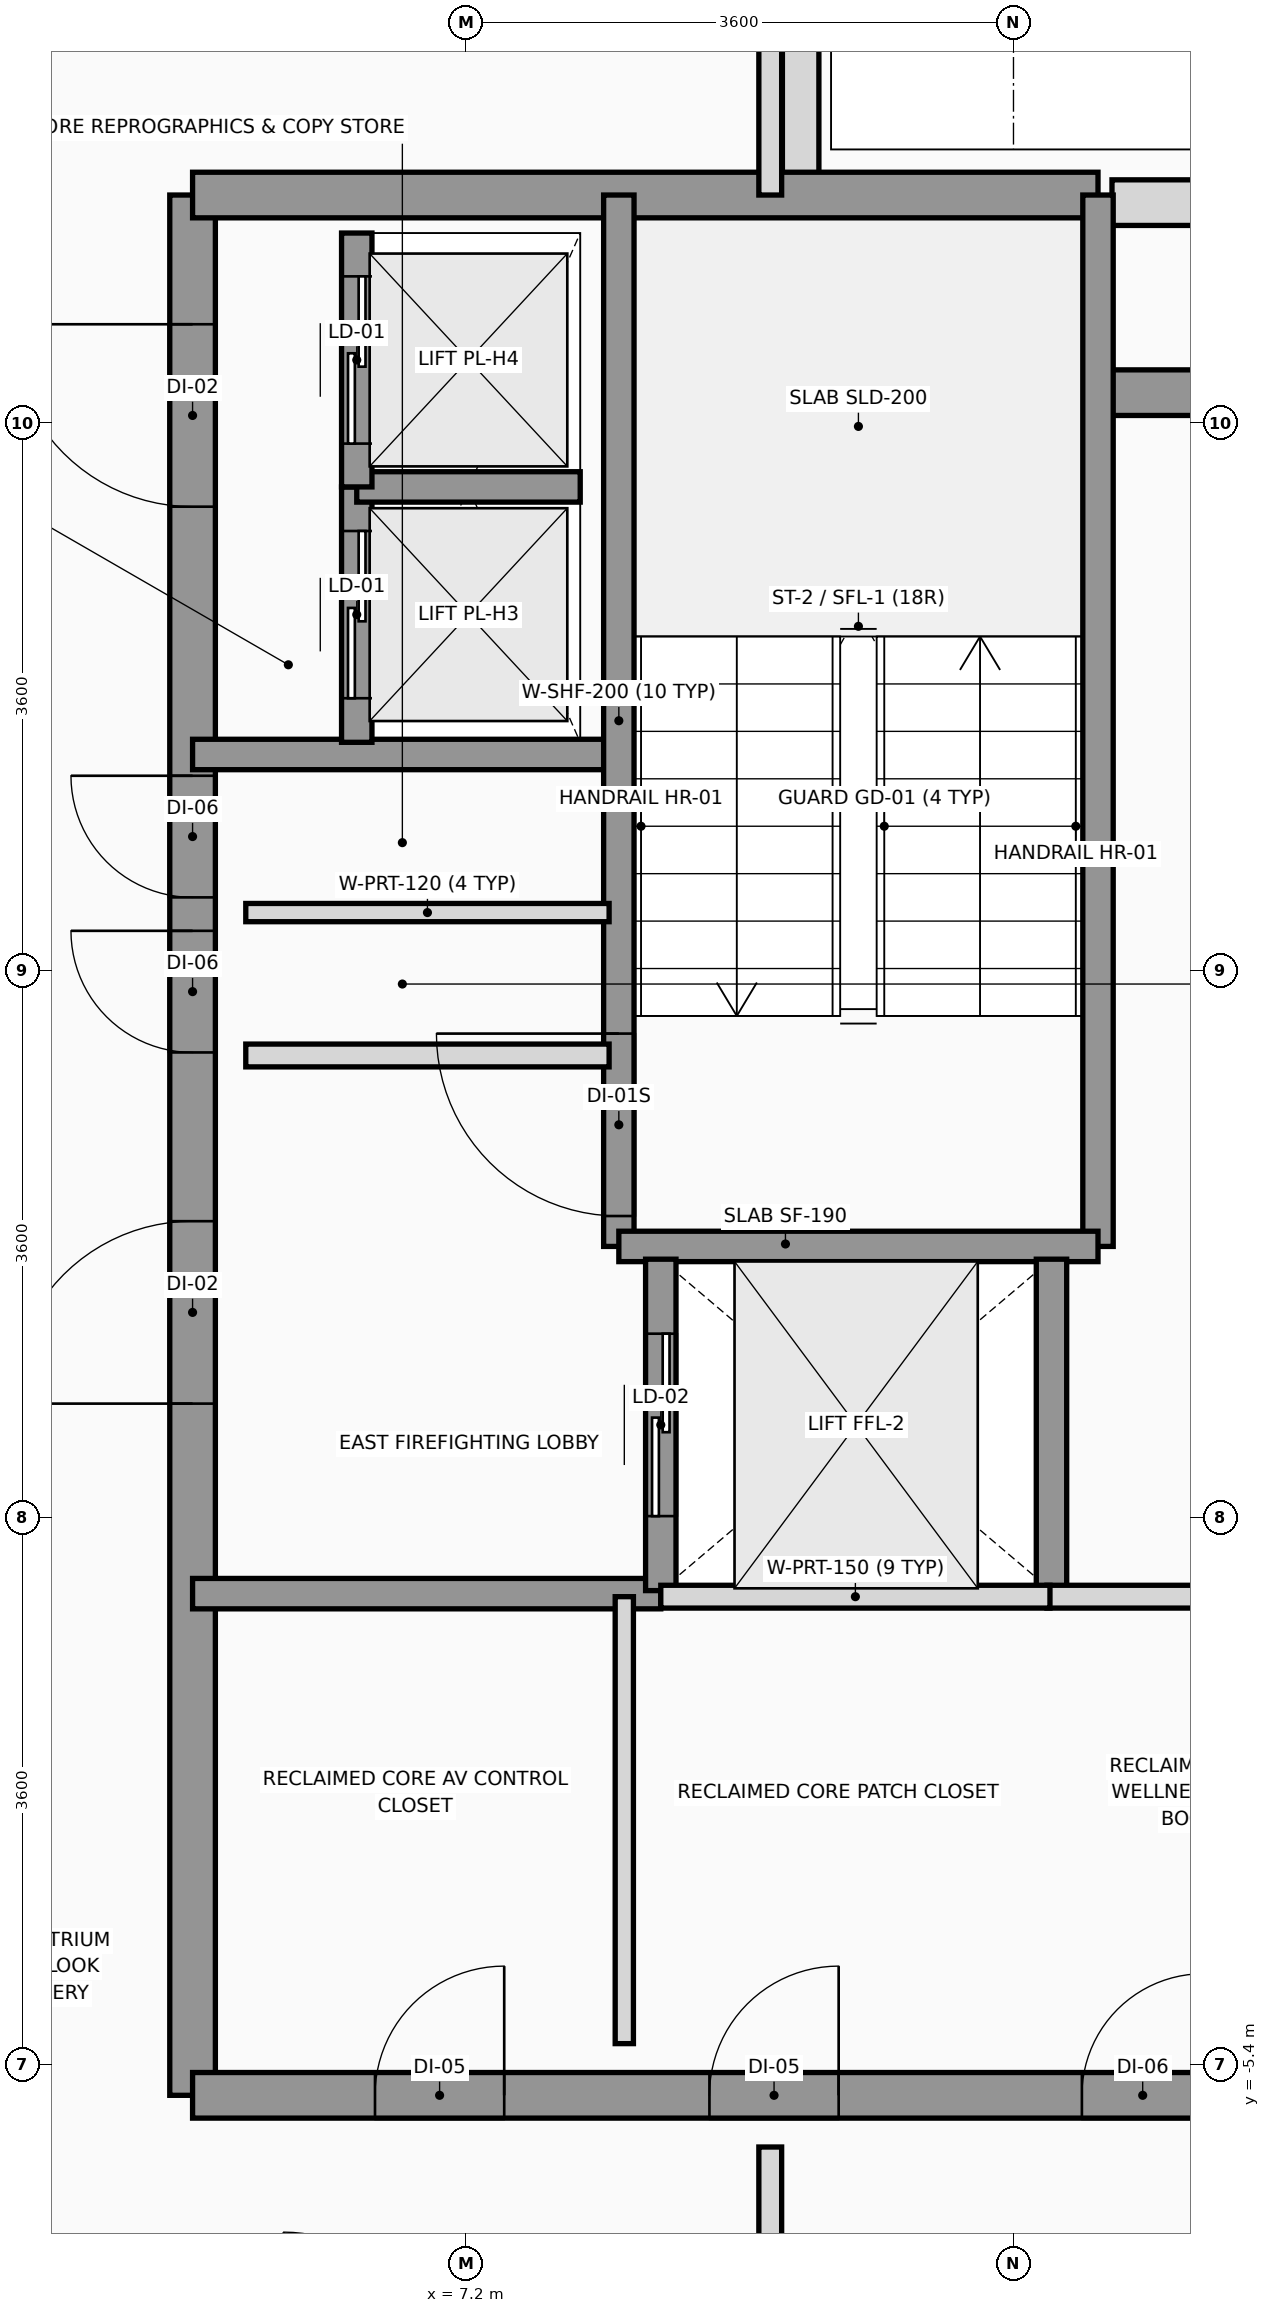
"""IFC4 building model, lengths in metres.
Left out: names, types, materials, properties, quantities, classifications, styles, units other than length and angle.
Written with IfcOpenShell. Run it as: python <this file> out.ifc"""

import sys

from ifc_helpers import new_model, si_unit, direction, frame, frame_2d, origin, place, context, subcontext, project, spatial, rectangle, extrude, source, transform, mapped, element, fill, save


model = new_model("IFC4")
c1 = context("Model", 3, precision=1e-05, world=origin(), true_north=direction((0.0, 1.0)))
c2 = subcontext(c1, "Body", "Model", "MODEL_VIEW")
j1 = project(units=[si_unit("LENGTHUNIT", "METRE"), si_unit("PLANEANGLEUNIT", "RADIAN")], contexts=[c1])
p1 = place(None, origin())
s1 = spatial("IfcSite", under=j1, at=p1, CompositionType="ELEMENT")
p2 = place(p1, origin())
s2 = spatial("IfcBuilding", under=s1, at=p2, CompositionType="ELEMENT")
p3 = place(p2, frame((0.0, 0.0, 223.6)))
s3 = spatial("IfcBuildingStorey", under=s2, at=p3, CompositionType="ELEMENT", Elevation=223.6)
p4 = place(p3, frame((11.448, 6.85, 0.0), z_axis=(0.0, 0.0, 1.0), x_axis=(1.0, 0.0, 0.0)))
e1 = element("IfcWall", 1, at=p4, inside=s3, PredefinedType="SOLIDWALL", context=c2, shape_type="SweptSolid", body=[
    extrude(rectangle(XDim=2.685, YDim=0.3, at=frame_2d((1.343, 0.0))), origin(), (0.0, 0.0, 1.0), 2.57),
])
p5 = place(p3, frame((9.4, 8.622, 0.0), z_axis=(0.0, 0.0, 1.0), x_axis=(0.0, -1.0, 0.0)))
e2 = element("IfcWall", 2, at=p5, inside=s3, PredefinedType="PARAPET", context=c2, shape_type="SweptSolid", body=[
    extrude(rectangle(XDim=1.669, YDim=0.24, at=frame_2d((0.834, 0.0))), origin(), (0.0, 0.0, 1.0), 1.15),
])
p6 = place(p3, frame((5.4, -5.6, 0.0), z_axis=(0.0, 0.0, 1.0), x_axis=(0.0, 1.0, 0.0)))
e3 = element("IfcWall", 3, at=p6, inside=s3, PredefinedType="SHEAR", context=c2, shape_type="SweptSolid", body=[
    extrude(rectangle(XDim=12.5, YDim=0.3, at=frame_2d((6.25, 0.0))), origin(), (0.0, 0.0, 1.0), 3.01),
])
p7 = place(p6, frame((4.55, 0.0, 0.0)))
e4 = element("IfcOpeningElement", 4, at=p7, cuts=e3, PredefinedType="OPENING", context=c2, shape_type="SweptSolid", body=[
    extrude(rectangle(XDim=1.2, YDim=2.2, at=frame_2d((0.6, 1.1))), frame((0.0, 0.16, 0.0), z_axis=(0.0, -1.0, 0.0), x_axis=(1.0, 0.0, 0.0)), (0.0, 0.0, 1.0), 0.32),
])
p8 = place(p6, frame((10.45, 0.0, 0.0)))
e5 = element("IfcOpeningElement", 5, at=p8, cuts=e3, PredefinedType="OPENING", context=c2, shape_type="SweptSolid", body=[
    extrude(rectangle(XDim=1.2, YDim=2.2, at=frame_2d((0.6, 1.1))), frame((0.0, 0.16, 0.0), z_axis=(0.0, -1.0, 0.0), x_axis=(1.0, 0.0, 0.0)), (0.0, 0.0, 1.0), 0.32),
])
p9 = place(p6, frame((6.86, 0.0, 0.0)))
e6 = element("IfcOpeningElement", 6, at=p9, cuts=e3, PredefinedType="OPENING", context=c2, shape_type="SweptSolid", body=[
    extrude(rectangle(XDim=0.8, YDim=2.1, at=frame_2d((0.4, 1.05))), frame((0.0, 0.16, 0.0), z_axis=(0.0, -1.0, 0.0), x_axis=(1.0, 0.0, 0.0)), (0.0, 0.0, 1.0), 0.32),
])
p10 = place(p6, frame((7.88, 0.0, 0.0)))
e7 = element("IfcOpeningElement", 7, at=p10, cuts=e3, PredefinedType="OPENING", context=c2, shape_type="SweptSolid", body=[
    extrude(rectangle(XDim=0.8, YDim=2.1, at=frame_2d((0.4, 1.05))), frame((0.0, 0.16, 0.0), z_axis=(0.0, -1.0, 0.0), x_axis=(1.0, 0.0, 0.0)), (0.0, 0.0, 1.0), 0.32),
])
p11 = place(p3, frame((5.4, 6.9, 0.0), z_axis=(0.0, 0.0, 1.0), x_axis=(1.0, 0.0, 0.0)))
e8 = element("IfcWall", 8, at=p11, inside=s3, PredefinedType="SHEAR", context=c2, shape_type="SweptSolid", body=[
    extrude(rectangle(XDim=5.956, YDim=0.3, at=frame_2d((2.978, 0.0))), origin(), (0.0, 0.0, 1.0), 3.01),
])
p12 = place(p3, frame((11.356, 5.6, 0.0), z_axis=(0.0, 0.0, 1.0), x_axis=(1.0, 0.0, 0.0)))
e9 = element("IfcWall", 9, at=p12, inside=s3, PredefinedType="SHEAR", context=c2, shape_type="SweptSolid", body=[
    extrude(rectangle(XDim=1.844, YDim=0.3, at=frame_2d((0.922, 0.0))), origin(), (0.0, 0.0, 1.0), 3.01),
])
p13 = place(p3, frame((5.4, -5.6, 0.0), z_axis=(0.0, 0.0, 1.0), x_axis=(1.0, 0.0, 0.0)))
e10 = element("IfcWall", 10, at=p13, inside=s3, PredefinedType="SHEAR", context=c2, shape_type="SweptSolid", body=[
    extrude(rectangle(XDim=7.8, YDim=0.3, at=frame_2d((3.9, 0.0))), origin(), (0.0, 0.0, 1.0), 3.01),
])
p14 = place(p13, frame((5.85, 0.0, 0.0)))
e11 = element("IfcOpeningElement", 11, at=p14, cuts=e10, PredefinedType="OPENING", context=c2, shape_type="SweptSolid", body=[
    extrude(rectangle(XDim=0.8, YDim=2.1, at=frame_2d((0.4, 1.05))), frame((0.0, 0.16, 0.0), z_axis=(0.0, -1.0, 0.0), x_axis=(1.0, 0.0, 0.0)), (0.0, 0.0, 1.0), 0.32),
])
p15 = place(p13, frame((1.2, 0.0, 0.0)))
e12 = element("IfcOpeningElement", 12, at=p15, cuts=e10, PredefinedType="OPENING", context=c2, shape_type="SweptSolid", body=[
    extrude(rectangle(XDim=0.85, YDim=2.1, at=frame_2d((0.425, 1.05))), frame((0.0, 0.16, 0.0), z_axis=(0.0, -1.0, 0.0), x_axis=(1.0, 0.0, 0.0)), (0.0, 0.0, 1.0), 0.32),
])
p16 = place(p13, frame((3.4, 0.0, 0.0)))
e13 = element("IfcOpeningElement", 13, at=p16, cuts=e10, PredefinedType="OPENING", context=c2, shape_type="SweptSolid", body=[
    extrude(rectangle(XDim=0.85, YDim=2.1, at=frame_2d((0.425, 1.05))), frame((0.0, 0.16, 0.0), z_axis=(0.0, -1.0, 0.0), x_axis=(1.0, 0.0, 0.0)), (0.0, 0.0, 1.0), 0.32),
])
p17 = place(p3, frame((5.4, 3.22, 0.0), z_axis=(0.0, 0.0, 1.0), x_axis=(1.0, 0.0, 0.0)))
e14 = element("IfcWall", 14, at=p17, inside=s3, PredefinedType="SOLIDWALL", context=c2, shape_type="SweptSolid", body=[
    extrude(rectangle(XDim=2.78, YDim=0.2, at=frame_2d((1.39, 0.0))), origin(), (0.0, 0.0, 1.0), 3.01),
])
p18 = place(p3, frame((5.4, -2.3, 0.0), z_axis=(0.0, 0.0, 1.0), x_axis=(1.0, 0.0, 0.0)))
e15 = element("IfcWall", 15, at=p18, inside=s3, PredefinedType="SOLIDWALL", context=c2, shape_type="SweptSolid", body=[
    extrude(rectangle(XDim=3.08, YDim=0.2, at=frame_2d((1.54, 0.0))), origin(), (0.0, 0.0, 1.0), 3.01),
])
p19 = place(p3, frame((8.204, -0.016, 0.0), z_axis=(0.0, 0.0, 1.0), x_axis=(0.0, 1.0, 0.0)))
e16 = element("IfcWall", 16, at=p19, inside=s3, PredefinedType="SOLIDWALL", context=c2, shape_type="SweptSolid", body=[
    extrude(rectangle(XDim=6.916, YDim=0.2, at=frame_2d((3.458, 0.0))), origin(), (0.0, 0.0, 1.0), 3.01),
])
p20 = place(p19, frame((0.2, 0.0, 0.0)))
e17 = element("IfcOpeningElement", 17, at=p20, cuts=e16, PredefinedType="OPENING", context=c2, shape_type="SweptSolid", body=[
    extrude(rectangle(XDim=1.2, YDim=2.2, at=frame_2d((0.6, 1.1))), frame((0.0, 0.11, 0.0), z_axis=(0.0, -1.0, 0.0), x_axis=(1.0, 0.0, 0.0)), (0.0, 0.0, 1.0), 0.22),
])
p21 = place(p3, frame((11.356, -0.016, 0.0), z_axis=(0.0, 0.0, 1.0), x_axis=(0.0, 1.0, 0.0)))
e18 = element("IfcWall", 18, at=p21, inside=s3, PredefinedType="SOLIDWALL", context=c2, shape_type="SweptSolid", body=[
    extrude(rectangle(XDim=6.916, YDim=0.2, at=frame_2d((3.458, 0.0))), origin(), (0.0, 0.0, 1.0), 3.01),
])
p22 = place(p3, frame((8.204, -0.016, 0.0), z_axis=(0.0, 0.0, 1.0), x_axis=(1.0, 0.0, 0.0)))
e19 = element("IfcWall", 19, at=p22, inside=s3, PredefinedType="SOLIDWALL", context=c2, shape_type="SweptSolid", body=[
    extrude(rectangle(XDim=3.152, YDim=0.2, at=frame_2d((1.576, 0.0))), origin(), (0.0, 0.0, 1.0), 3.01),
])
p23 = place(p3, frame((8.48, -2.28, 0.0), z_axis=(0.0, 0.0, 1.0), x_axis=(0.0, 1.0, 0.0)))
e20 = element("IfcWall", 20, at=p23, inside=s3, PredefinedType="SOLIDWALL", context=c2, shape_type="SweptSolid", body=[
    extrude(rectangle(XDim=2.18, YDim=0.2, at=frame_2d((1.09, 0.0))), origin(), (0.0, 0.0, 1.0), 3.01),
])
p24 = place(p23, frame((0.49, 0.0, 0.0)))
e21 = element("IfcOpeningElement", 21, at=p24, cuts=e20, PredefinedType="OPENING", context=c2, shape_type="SweptSolid", body=[
    extrude(rectangle(XDim=1.2, YDim=2.2, at=frame_2d((0.6, 1.1))), frame((0.0, 0.11, 0.0), z_axis=(0.0, -1.0, 0.0), x_axis=(1.0, 0.0, 0.0)), (0.0, 0.0, 1.0), 0.22),
])
p25 = place(p3, frame((11.05, -2.28, 0.0), z_axis=(0.0, 0.0, 1.0), x_axis=(0.0, 1.0, 0.0)))
e22 = element("IfcWall", 22, at=p25, inside=s3, PredefinedType="SOLIDWALL", context=c2, shape_type="SweptSolid", body=[
    extrude(rectangle(XDim=2.18, YDim=0.2, at=frame_2d((1.09, 0.0))), origin(), (0.0, 0.0, 1.0), 3.01),
])
p26 = place(p3, frame((6.48, 3.3, 0.0), z_axis=(0.0, 0.0, 1.0), x_axis=(0.0, 1.0, 0.0)))
e23 = element("IfcWall", 23, at=p26, inside=s3, PredefinedType="SOLIDWALL", context=c2, shape_type="SweptSolid", body=[
    extrude(rectangle(XDim=1.68, YDim=0.2, at=frame_2d((0.84, 0.0))), origin(), (0.0, 0.0, 1.0), 3.01),
])
p27 = place(p26, frame((0.29, 0.0, 0.0)))
e24 = element("IfcOpeningElement", 24, at=p27, cuts=e23, PredefinedType="OPENING", context=c2, shape_type="SweptSolid", body=[
    extrude(rectangle(XDim=1.1, YDim=2.2, at=frame_2d((0.55, 1.1))), frame((0.0, 0.11, 0.0), z_axis=(0.0, -1.0, 0.0), x_axis=(1.0, 0.0, 0.0)), (0.0, 0.0, 1.0), 0.22),
])
p28 = place(p3, frame((6.48, 4.98, 0.0), z_axis=(0.0, 0.0, 1.0), x_axis=(1.0, 0.0, 0.0)))
e25 = element("IfcWall", 25, at=p28, inside=s3, PredefinedType="SOLIDWALL", context=c2, shape_type="SweptSolid", body=[
    extrude(rectangle(XDim=1.47, YDim=0.2, at=frame_2d((0.735, 0.0))), origin(), (0.0, 0.0, 1.0), 3.01),
])
p29 = place(p3, frame((6.48, 4.98, 0.0), z_axis=(0.0, 0.0, 1.0), x_axis=(0.0, 1.0, 0.0)))
e26 = element("IfcWall", 26, at=p29, inside=s3, PredefinedType="SOLIDWALL", context=c2, shape_type="SweptSolid", body=[
    extrude(rectangle(XDim=1.67, YDim=0.2, at=frame_2d((0.835, 0.0))), origin(), (0.0, 0.0, 1.0), 3.01),
])
p30 = place(p29, frame((0.285, 0.0, 0.0)))
e27 = element("IfcOpeningElement", 27, at=p30, cuts=e26, PredefinedType="OPENING", context=c2, shape_type="SweptSolid", body=[
    extrude(rectangle(XDim=1.1, YDim=2.2, at=frame_2d((0.55, 1.1))), frame((0.0, 0.11, 0.0), z_axis=(0.0, -1.0, 0.0), x_axis=(1.0, 0.0, 0.0)), (0.0, 0.0, 1.0), 0.22),
])
p31 = place(p3, frame((5.75, 1.24, 0.0), z_axis=(0.0, 0.0, 1.0), x_axis=(1.0, 0.0, 0.0)))
e28 = element("IfcWall", 28, at=p31, inside=s3, PredefinedType="PARTITIONING", context=c2, shape_type="SweptSolid", body=[
    extrude(rectangle(XDim=2.39, YDim=0.15, at=frame_2d((1.195, 0.0))), origin(), (0.0, 0.0, 1.0), 3.01),
])
p32 = place(p3, frame((5.75, 2.18, 0.0), z_axis=(0.0, 0.0, 1.0), x_axis=(1.0, 0.0, 0.0)))
e29 = element("IfcWall", 29, at=p32, inside=s3, PredefinedType="PARTITIONING", context=c2, shape_type="SweptSolid", body=[
    extrude(rectangle(XDim=2.39, YDim=0.12, at=frame_2d((1.195, 0.0))), origin(), (0.0, 0.0, 1.0), 3.01),
])
p33 = place(p3, frame((11.02, -2.32, 0.0), z_axis=(0.0, 0.0, 1.0), x_axis=(1.0, 0.0, 0.0)))
e30 = element("IfcWall", 30, at=p33, inside=s3, PredefinedType="PARTITIONING", context=c2, shape_type="SweptSolid", body=[
    extrude(rectangle(XDim=2.18, YDim=0.15, at=frame_2d((1.09, 0.0))), origin(), (0.0, 0.0, 1.0), 3.01),
])
p34 = place(p3, frame((8.24, -5.26, 0.0), z_axis=(0.0, 0.0, 1.0), x_axis=(0.0, 1.0, 0.0)))
e31 = element("IfcWall", 31, at=p34, inside=s3, PredefinedType="PARTITIONING", context=c2, shape_type="SweptSolid", body=[
    extrude(rectangle(XDim=2.94, YDim=0.12, at=frame_2d((1.47, 0.0))), origin(), (0.0, 0.0, 1.0), 3.01),
])
p35 = place(p3, frame((8.48, -2.32, 0.0), z_axis=(0.0, 0.0, 1.0), x_axis=(1.0, 0.0, 0.0)))
e32 = element("IfcWall", 32, at=p35, inside=s3, PredefinedType="PARTITIONING", context=c2, shape_type="SweptSolid", body=[
    extrude(rectangle(XDim=2.56, YDim=0.15, at=frame_2d((1.28, 0.0))), origin(), (0.0, 0.0, 1.0), 3.01),
])
p36 = place(p3, frame((9.2, 6.9, 0.0), z_axis=(0.0, 0.0, 1.0), x_axis=(0.0, 1.0, 0.0)))
e33 = element("IfcWall", 33, at=p36, inside=s3, PredefinedType="PARTITIONING", context=c2, shape_type="SweptSolid", body=[
    extrude(rectangle(XDim=3.38, YDim=0.15, at=frame_2d((1.69, 0.0))), origin(), (0.0, 0.0, 1.0), 2.61),
])
p37 = place(p3, frame((9.2, -10.28, 0.0), z_axis=(0.0, 0.0, 1.0), x_axis=(0.0, 1.0, 0.0)))
e34 = element("IfcWall", 34, at=p37, inside=s3, PredefinedType="PARTITIONING", context=c2, shape_type="SweptSolid", body=[
    extrude(rectangle(XDim=4.34, YDim=0.15, at=frame_2d((2.17, 0.0))), origin(), (0.0, 0.0, 1.0), 2.61),
])
m1 = source(origin(), c2, "Body", "SweptSolid", [
    extrude(rectangle(XDim=1.2, YDim=2.2, at=frame_2d((0.6, 1.1))), frame((0.0, 0.025, 0.0), z_axis=(0.0, -1.0, 0.0), x_axis=(1.0, 0.0, 0.0)), (0.0, 0.0, 1.0), 0.05),
])
p38 = place(p20, origin())
e35 = element("IfcDoor", 35, at=p38, inside=s3, OperationType="SINGLE_SWING_RIGHT", PredefinedType="DOOR", context=c2, shape_type="MappedRepresentation", body=[
    mapped(m1, transform((0.0, 0.0, 0.0), x_axis=(1.0, 0.0, 0.0), y_axis=(0.0, 1.0, 0.0), z_axis=(0.0, 0.0, 1.0), scale=1.0)),
])
fill(e17, e35)
p39 = place(p7, origin())
e36 = element("IfcDoor", 36, at=p39, inside=s3, OperationType="SINGLE_SWING_LEFT", PredefinedType="DOOR", context=c2, shape_type="MappedRepresentation", body=[
    mapped(m1, transform((0.0, 0.0, 0.0), x_axis=(1.0, 0.0, 0.0), y_axis=(0.0, 1.0, 0.0), z_axis=(0.0, 0.0, 1.0), scale=1.0)),
])
fill(e4, e36)
p40 = place(p8, origin())
e37 = element("IfcDoor", 37, at=p40, inside=s3, OperationType="SINGLE_SWING_RIGHT", PredefinedType="DOOR", context=c2, shape_type="MappedRepresentation", body=[
    mapped(m1, transform((0.0, 0.0, 0.0), x_axis=(1.0, 0.0, 0.0), y_axis=(0.0, 1.0, 0.0), z_axis=(0.0, 0.0, 1.0), scale=1.0)),
])
fill(e5, e37)
m2 = source(origin(), c2, "Body", "SweptSolid", [
    extrude(rectangle(XDim=0.8, YDim=2.1, at=frame_2d((0.4, 1.05))), frame((0.0, 0.025, 0.0), z_axis=(0.0, -1.0, 0.0), x_axis=(1.0, 0.0, 0.0)), (0.0, 0.0, 1.0), 0.05),
])
p41 = place(p9, origin())
e38 = element("IfcDoor", 38, at=p41, inside=s3, OperationType="SINGLE_SWING_RIGHT", PredefinedType="DOOR", context=c2, shape_type="MappedRepresentation", body=[
    mapped(m2, transform((0.0, 0.0, 0.0), x_axis=(1.0, 0.0, 0.0), y_axis=(0.0, 1.0, 0.0), z_axis=(0.0, 0.0, 1.0), scale=1.0)),
])
fill(e6, e38)
p42 = place(p10, origin())
e39 = element("IfcDoor", 39, at=p42, inside=s3, OperationType="SINGLE_SWING_RIGHT", PredefinedType="DOOR", context=c2, shape_type="MappedRepresentation", body=[
    mapped(m2, transform((0.0, 0.0, 0.0), x_axis=(1.0, 0.0, 0.0), y_axis=(0.0, 1.0, 0.0), z_axis=(0.0, 0.0, 1.0), scale=1.0)),
])
fill(e7, e39)
p43 = place(p14, origin())
e40 = element("IfcDoor", 40, at=p43, inside=s3, OperationType="SINGLE_SWING_RIGHT", PredefinedType="DOOR", context=c2, shape_type="MappedRepresentation", body=[
    mapped(m2, transform((0.0, 0.0, 0.0), x_axis=(1.0, 0.0, 0.0), y_axis=(0.0, 1.0, 0.0), z_axis=(0.0, 0.0, 1.0), scale=1.0)),
])
fill(e11, e40)
m3 = source(origin(), c2, "Body", "SweptSolid", [
    extrude(rectangle(XDim=0.85, YDim=2.1, at=frame_2d((0.425, 1.05))), frame((0.0, 0.025, 0.0), z_axis=(0.0, -1.0, 0.0), x_axis=(1.0, 0.0, 0.0)), (0.0, 0.0, 1.0), 0.05),
])
p44 = place(p15, origin())
e41 = element("IfcDoor", 41, at=p44, inside=s3, OperationType="SINGLE_SWING_RIGHT", PredefinedType="DOOR", context=c2, shape_type="MappedRepresentation", body=[
    mapped(m3, transform((0.0, 0.0, 0.0), x_axis=(1.0, 0.0, 0.0), y_axis=(0.0, 1.0, 0.0), z_axis=(0.0, 0.0, 1.0), scale=1.0)),
])
fill(e12, e41)
p45 = place(p16, origin())
e42 = element("IfcDoor", 42, at=p45, inside=s3, OperationType="SINGLE_SWING_RIGHT", PredefinedType="DOOR", context=c2, shape_type="MappedRepresentation", body=[
    mapped(m3, transform((0.0, 0.0, 0.0), x_axis=(1.0, 0.0, 0.0), y_axis=(0.0, 1.0, 0.0), z_axis=(0.0, 0.0, 1.0), scale=1.0)),
])
fill(e13, e42)
p46 = place(p24, origin())
e43 = element("IfcDoor", 43, at=p46, inside=s3, OperationType="SLIDING_TO_RIGHT", PredefinedType="DOOR", context=c2, shape_type="MappedRepresentation", body=[
    mapped(m1, transform((0.0, 0.0, 0.0), x_axis=(1.0, 0.0, 0.0), y_axis=(0.0, 1.0, 0.0), z_axis=(0.0, 0.0, 1.0), scale=1.0)),
])
fill(e21, e43)
m4 = source(origin(), c2, "Body", "SweptSolid", [
    extrude(rectangle(XDim=1.1, YDim=2.2, at=frame_2d((0.55, 1.1))), frame((0.0, 0.025, 0.0), z_axis=(0.0, -1.0, 0.0), x_axis=(1.0, 0.0, 0.0)), (0.0, 0.0, 1.0), 0.05),
])
p47 = place(p27, origin())
e44 = element("IfcDoor", 44, at=p47, inside=s3, OperationType="SLIDING_TO_LEFT", PredefinedType="DOOR", context=c2, shape_type="MappedRepresentation", body=[
    mapped(m4, transform((0.0, 0.0, 0.0), x_axis=(1.0, 0.0, 0.0), y_axis=(0.0, 1.0, 0.0), z_axis=(0.0, 0.0, 1.0), scale=1.0)),
])
fill(e24, e44)
p48 = place(p30, origin())
e45 = element("IfcDoor", 45, at=p48, inside=s3, OperationType="SLIDING_TO_LEFT", PredefinedType="DOOR", context=c2, shape_type="MappedRepresentation", body=[
    mapped(m4, transform((0.0, 0.0, 0.0), x_axis=(1.0, 0.0, 0.0), y_axis=(0.0, 1.0, 0.0), z_axis=(0.0, 0.0, 1.0), scale=1.0)),
])
fill(e27, e45)
save(model, sys.argv[1])
